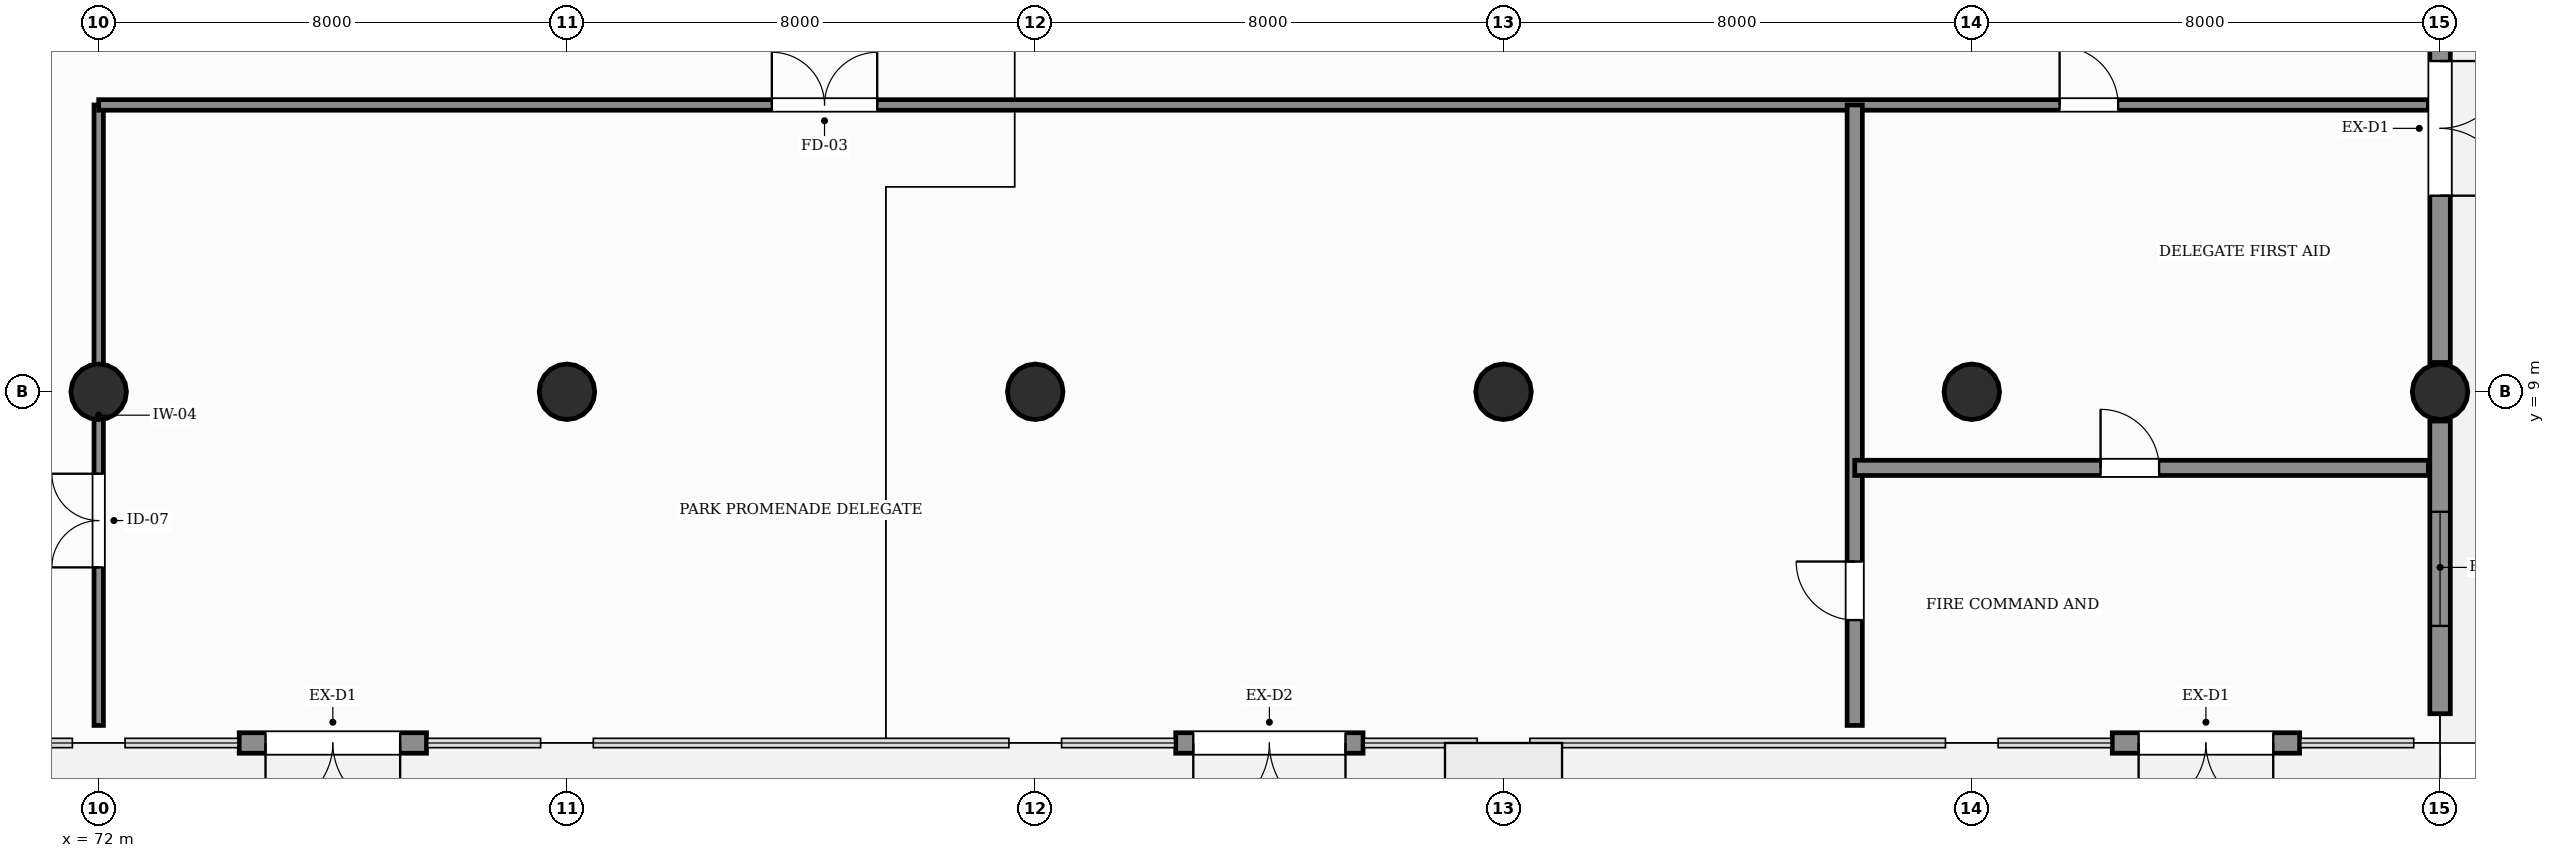
"""IFC4 building model, lengths in metres.
Left out: names, types, materials, properties, quantities, classifications, styles, units other than length and angle.
Written with IfcOpenShell. Run it as: python <this file> out.ifc"""

import sys

from ifc_helpers import new_model, si_unit, direction, frame, frame_2d, origin, origin_2d, place, context, subcontext, project, spatial, rectangle, circle, extrude, element, fill, save


model = new_model("IFC4")
c1 = context("Model", 3, precision=1e-05, world=origin(), true_north=direction((0.0, 1.0)))
c2 = subcontext(c1, "Body", "Model", "MODEL_VIEW")
j1 = project(units=[si_unit("LENGTHUNIT", "METRE"), si_unit("PLANEANGLEUNIT", "RADIAN")], contexts=[c1])
p1 = place(None, origin())
s1 = spatial("IfcSite", under=j1, at=p1, CompositionType="ELEMENT")
p2 = place(p1, origin())
s2 = spatial("IfcBuilding", under=s1, at=p2, CompositionType="ELEMENT")
p3 = place(p2, origin())
s3 = spatial("IfcBuildingStorey", under=s2, at=p3, CompositionType="ELEMENT", Elevation=0.0)
for number, where, z_axis, x_axis in (
    (1, (72.0, 9.0, 0.0), (0.0, 0.0, 1.0), (1.0, 0.0, 0.0)),
    (2, (80.0, 9.0, 0.0), (0.0, 0.0, 1.0), (1.0, 0.0, 0.0)),
    (3, (88.0, 9.0, 0.0), (0.0, 0.0, 1.0), (1.0, 0.0, 0.0)),
    (4, (96.0, 9.0, 0.0), (0.0, 0.0, 1.0), (1.0, 0.0, 0.0)),
    (5, (104.0, 9.0, 0.0), (0.0, 0.0, 1.0), (1.0, 0.0, 0.0)),
    (6, (112.0, 9.0, 0.0), (0.0, 0.0, 1.0), (1.0, 0.0, 0.0)),
):
    element("IfcColumn", number, at=place(p3, frame(where, z_axis=z_axis, x_axis=x_axis)), inside=s3, PredefinedType="COLUMN", context=c2, shape_type="SweptSolid", body=[
        extrude(circle(Radius=0.475, at=origin_2d()), origin(), (0.0, 0.0, 1.0), 6.0),
    ])
p4 = place(p3, frame((74.4, 3.0, 0.0), z_axis=(0.0, 0.0, 1.0), x_axis=(1.0, 0.0, 0.0)))
e7 = element("IfcWall", 7, at=p4, inside=s3, PredefinedType="SOLIDWALL", context=c2, shape_type="SweptSolid", body=[
    extrude(rectangle(XDim=3.2, YDim=0.35, at=frame_2d((1.6, 0.0))), origin(), (0.0, 0.0, 1.0), 4.7),
])
p5 = place(p4, frame((0.45, 0.0, 0.0)))
e8 = element("IfcOpeningElement", 8, at=p5, cuts=e7, PredefinedType="OPENING", context=c2, shape_type="SweptSolid", body=[
    extrude(rectangle(XDim=2.3, YDim=2.4, at=frame_2d((1.15, 1.2))), frame((0.0, 0.185, 0.0), z_axis=(0.0, -1.0, 0.0), x_axis=(1.0, 0.0, 0.0)), (0.0, 0.0, 1.0), 0.37),
])
p6 = place(p3, frame((90.4, 3.0, 0.0), z_axis=(0.0, 0.0, 1.0), x_axis=(1.0, 0.0, 0.0)))
e9 = element("IfcWall", 9, at=p6, inside=s3, PredefinedType="SOLIDWALL", context=c2, shape_type="SweptSolid", body=[
    extrude(rectangle(XDim=3.2, YDim=0.35, at=frame_2d((1.6, 0.0))), origin(), (0.0, 0.0, 1.0), 4.7),
])
p7 = place(p6, frame((0.3, 0.0, 0.0)))
e10 = element("IfcOpeningElement", 10, at=p7, cuts=e9, PredefinedType="OPENING", context=c2, shape_type="SweptSolid", body=[
    extrude(rectangle(XDim=2.6, YDim=2.7, at=frame_2d((1.3, 1.35))), frame((0.0, 0.185, 0.0), z_axis=(0.0, -1.0, 0.0), x_axis=(1.0, 0.0, 0.0)), (0.0, 0.0, 1.0), 0.37),
])
p8 = place(p3, frame((106.4, 3.0, 0.0), z_axis=(0.0, 0.0, 1.0), x_axis=(1.0, 0.0, 0.0)))
e11 = element("IfcWall", 11, at=p8, inside=s3, PredefinedType="SOLIDWALL", context=c2, shape_type="SweptSolid", body=[
    extrude(rectangle(XDim=3.2, YDim=0.35, at=frame_2d((1.6, 0.0))), origin(), (0.0, 0.0, 1.0), 4.7),
])
p9 = place(p8, frame((0.45, 0.0, 0.0)))
e12 = element("IfcOpeningElement", 12, at=p9, cuts=e11, PredefinedType="OPENING", context=c2, shape_type="SweptSolid", body=[
    extrude(rectangle(XDim=2.3, YDim=2.4, at=frame_2d((1.15, 1.2))), frame((0.0, 0.185, 0.0), z_axis=(0.0, -1.0, 0.0), x_axis=(1.0, 0.0, 0.0)), (0.0, 0.0, 1.0), 0.37),
])
p10 = place(p3, frame((112.0, 3.5, 0.0), z_axis=(0.0, 0.0, 1.0), x_axis=(0.0, 1.0, 0.0)))
e13 = element("IfcWall", 13, at=p10, inside=s3, PredefinedType="SOLIDWALL", context=c2, shape_type="SweptSolid", body=[
    extrude(rectangle(XDim=5.0, YDim=0.35, at=frame_2d((2.5, 0.0))), origin(), (0.0, 0.0, 1.0), 4.7),
])
p11 = place(p10, frame((1.5, 0.0, 1.0)))
e14 = element("IfcOpeningElement", 14, at=p11, cuts=e13, PredefinedType="OPENING", context=c2, shape_type="SweptSolid", body=[
    extrude(rectangle(XDim=1.95, YDim=1.85, at=frame_2d((0.975, 0.925))), frame((0.0, 0.185, 0.0), z_axis=(0.0, -1.0, 0.0), x_axis=(1.0, 0.0, 0.0)), (0.0, 0.0, 1.0), 0.37),
])
p12 = place(p3, frame((112.0, 9.5, 0.0), z_axis=(0.0, 0.0, 1.0), x_axis=(0.0, 1.0, 0.0)))
e15 = element("IfcWall", 15, at=p12, inside=s3, PredefinedType="SOLIDWALL", context=c2, shape_type="SweptSolid", body=[
    extrude(rectangle(XDim=8.0, YDim=0.35, at=frame_2d((4.0, 0.0))), origin(), (0.0, 0.0, 1.0), 4.7),
])
p13 = place(p12, frame((2.85, 0.0, 0.0)))
e16 = element("IfcOpeningElement", 16, at=p13, cuts=e15, PredefinedType="OPENING", context=c2, shape_type="SweptSolid", body=[
    extrude(rectangle(XDim=2.3, YDim=2.4, at=frame_2d((1.15, 1.2))), frame((0.0, 0.185, 0.0), z_axis=(0.0, -1.0, 0.0), x_axis=(1.0, 0.0, 0.0)), (0.0, 0.0, 1.0), 0.37),
])
p14 = place(p3, frame((72.0, 3.3, 0.0), z_axis=(0.0, 0.0, 1.0), x_axis=(0.0, 1.0, 0.0)))
e17 = element("IfcWall", 17, at=p14, inside=s3, PredefinedType="PARTITIONING", context=c2, shape_type="SweptSolid", body=[
    extrude(rectangle(XDim=10.6, YDim=0.16, at=frame_2d((5.3, 0.0))), origin(), (0.0, 0.0, 1.0), 4.65),
])
p15 = place(p14, frame((2.7, 0.0, 0.0)))
e18 = element("IfcOpeningElement", 18, at=p15, cuts=e17, PredefinedType="OPENING", context=c2, shape_type="SweptSolid", body=[
    extrude(rectangle(XDim=1.6, YDim=2.3, at=frame_2d((0.8, 1.15))), frame((0.0, 0.09, 0.0), z_axis=(0.0, -1.0, 0.0), x_axis=(1.0, 0.0, 0.0)), (0.0, 0.0, 1.0), 0.18),
])
p16 = place(p3, frame((72.0, 13.9, 0.0), z_axis=(0.0, 0.0, 1.0), x_axis=(1.0, 0.0, 0.0)))
e19 = element("IfcWall", 19, at=p16, inside=s3, PredefinedType="PARTITIONING", context=c2, shape_type="SweptSolid", body=[
    extrude(rectangle(XDim=39.8, YDim=0.18, at=frame_2d((19.9, 0.0))), origin(), (0.0, 0.0, 1.0), 4.65),
])
p17 = place(p16, frame((11.5, 0.0, 0.0)))
e20 = element("IfcOpeningElement", 20, at=p17, cuts=e19, PredefinedType="OPENING", context=c2, shape_type="SweptSolid", body=[
    extrude(rectangle(XDim=1.8, YDim=2.25, at=frame_2d((0.9, 1.125))), frame((0.0, 0.1, 0.0), z_axis=(0.0, -1.0, 0.0), x_axis=(1.0, 0.0, 0.0)), (0.0, 0.0, 1.0), 0.2),
])
p18 = place(p16, frame((33.5, 0.0, 0.0)))
e21 = element("IfcOpeningElement", 21, at=p18, cuts=e19, PredefinedType="OPENING", context=c2, shape_type="SweptSolid", body=[
    extrude(rectangle(XDim=1.0, YDim=2.15, at=frame_2d((0.5, 1.075))), frame((0.0, 0.1, 0.0), z_axis=(0.0, -1.0, 0.0), x_axis=(1.0, 0.0, 0.0)), (0.0, 0.0, 1.0), 0.2),
])
p19 = place(p3, frame((102.0, 3.3, 0.0), z_axis=(0.0, 0.0, 1.0), x_axis=(0.0, 1.0, 0.0)))
e22 = element("IfcWall", 22, at=p19, inside=s3, PredefinedType="SOLIDWALL", context=c2, shape_type="SweptSolid", body=[
    extrude(rectangle(XDim=10.6, YDim=0.26, at=frame_2d((5.3, 0.0))), origin(), (0.0, 0.0, 1.0), 6.0),
])
p20 = place(p19, frame((1.8, 0.0, 0.0)))
e23 = element("IfcOpeningElement", 23, at=p20, cuts=e22, PredefinedType="OPENING", context=c2, shape_type="SweptSolid", body=[
    extrude(rectangle(XDim=1.0, YDim=2.15, at=frame_2d((0.5, 1.075))), frame((0.0, 0.14, 0.0), z_axis=(0.0, -1.0, 0.0), x_axis=(1.0, 0.0, 0.0)), (0.0, 0.0, 1.0), 0.28),
])
p21 = place(p3, frame((102.0, 7.7, 0.0), z_axis=(0.0, 0.0, 1.0), x_axis=(1.0, 0.0, 0.0)))
e24 = element("IfcWall", 24, at=p21, inside=s3, PredefinedType="SOLIDWALL", context=c2, shape_type="SweptSolid", body=[
    extrude(rectangle(XDim=9.8, YDim=0.26, at=frame_2d((4.9, 0.0))), origin(), (0.0, 0.0, 1.0), 6.0),
])
p22 = place(p21, frame((4.2, 0.0, 0.0)))
e25 = element("IfcOpeningElement", 25, at=p22, cuts=e24, PredefinedType="OPENING", context=c2, shape_type="SweptSolid", body=[
    extrude(rectangle(XDim=1.0, YDim=2.15, at=frame_2d((0.5, 1.075))), frame((0.0, 0.14, 0.0), z_axis=(0.0, -1.0, 0.0), x_axis=(1.0, 0.0, 0.0)), (0.0, 0.0, 1.0), 0.28),
])
p23 = place(p5, frame((2.3, 0.0, 0.0), z_axis=(0.0, 0.0, 1.0), x_axis=(-1.0, 0.0, 0.0)))
e26 = element("IfcDoor", 26, at=p23, inside=s3, OperationType="DOUBLE_DOOR_SINGLE_SWING", PredefinedType="DOOR", context=c2, shape_type="SweptSolid", body=[
    extrude(rectangle(XDim=2.3, YDim=2.4, at=frame_2d((1.15, 1.2))), frame((0.0, 0.025, 0.0), z_axis=(0.0, -1.0, 0.0), x_axis=(1.0, 0.0, 0.0)), (0.0, 0.0, 1.0), 0.05),
])
fill(e8, e26)
p24 = place(p7, frame((2.6, 0.0, 0.0), z_axis=(0.0, 0.0, 1.0), x_axis=(-1.0, 0.0, 0.0)))
e27 = element("IfcDoor", 27, at=p24, inside=s3, OperationType="DOUBLE_DOOR_SINGLE_SWING", PredefinedType="DOOR", context=c2, shape_type="SweptSolid", body=[
    extrude(rectangle(XDim=2.6, YDim=2.7, at=frame_2d((1.3, 1.35))), frame((0.0, 0.025, 0.0), z_axis=(0.0, -1.0, 0.0), x_axis=(1.0, 0.0, 0.0)), (0.0, 0.0, 1.0), 0.05),
])
fill(e10, e27)
p25 = place(p9, frame((2.3, 0.0, 0.0), z_axis=(0.0, 0.0, 1.0), x_axis=(-1.0, 0.0, 0.0)))
e28 = element("IfcDoor", 28, at=p25, inside=s3, OperationType="DOUBLE_DOOR_SINGLE_SWING", PredefinedType="DOOR", context=c2, shape_type="SweptSolid", body=[
    extrude(rectangle(XDim=2.3, YDim=2.4, at=frame_2d((1.15, 1.2))), frame((0.0, 0.025, 0.0), z_axis=(0.0, -1.0, 0.0), x_axis=(1.0, 0.0, 0.0)), (0.0, 0.0, 1.0), 0.05),
])
fill(e12, e28)
p26 = place(p11, origin())
e29 = element("IfcWindow", 29, at=p26, inside=s3, PartitioningType="SINGLE_PANEL", PredefinedType="WINDOW", context=c2, shape_type="SweptSolid", body=[
    extrude(rectangle(XDim=1.95, YDim=1.85, at=frame_2d((0.975, 0.925))), frame((0.0, 0.03, 0.0), z_axis=(0.0, -1.0, 0.0), x_axis=(1.0, 0.0, 0.0)), (0.0, 0.0, 1.0), 0.06),
])
fill(e14, e29)
p27 = place(p13, frame((2.3, 0.0, 0.0), z_axis=(0.0, 0.0, 1.0), x_axis=(-1.0, 0.0, 0.0)))
e30 = element("IfcDoor", 30, at=p27, inside=s3, OperationType="DOUBLE_DOOR_SINGLE_SWING", PredefinedType="DOOR", context=c2, shape_type="SweptSolid", body=[
    extrude(rectangle(XDim=2.3, YDim=2.4, at=frame_2d((1.15, 1.2))), frame((0.0, 0.025, 0.0), z_axis=(0.0, -1.0, 0.0), x_axis=(1.0, 0.0, 0.0)), (0.0, 0.0, 1.0), 0.05),
])
fill(e16, e30)
p28 = place(p15, origin())
e31 = element("IfcDoor", 31, at=p28, inside=s3, OperationType="DOUBLE_DOOR_SINGLE_SWING", PredefinedType="DOOR", context=c2, shape_type="SweptSolid", body=[
    extrude(rectangle(XDim=1.6, YDim=2.3, at=frame_2d((0.8, 1.15))), frame((0.0, 0.025, 0.0), z_axis=(0.0, -1.0, 0.0), x_axis=(1.0, 0.0, 0.0)), (0.0, 0.0, 1.0), 0.05),
])
fill(e18, e31)
p29 = place(p17, origin())
e32 = element("IfcDoor", 32, at=p29, inside=s3, OperationType="DOUBLE_DOOR_SINGLE_SWING", PredefinedType="DOOR", context=c2, shape_type="SweptSolid", body=[
    extrude(rectangle(XDim=1.8, YDim=2.25, at=frame_2d((0.9, 1.125))), frame((0.0, 0.025, 0.0), z_axis=(0.0, -1.0, 0.0), x_axis=(1.0, 0.0, 0.0)), (0.0, 0.0, 1.0), 0.05),
])
fill(e20, e32)
p30 = place(p18, origin())
e33 = element("IfcDoor", 33, at=p30, inside=s3, OperationType="SINGLE_SWING_LEFT", PredefinedType="DOOR", context=c2, shape_type="SweptSolid", body=[
    extrude(rectangle(XDim=1.0, YDim=2.15, at=frame_2d((0.5, 1.075))), frame((0.0, 0.025, 0.0), z_axis=(0.0, -1.0, 0.0), x_axis=(1.0, 0.0, 0.0)), (0.0, 0.0, 1.0), 0.05),
])
fill(e21, e33)
p31 = place(p20, origin())
e34 = element("IfcDoor", 34, at=p31, inside=s3, OperationType="SINGLE_SWING_RIGHT", PredefinedType="DOOR", context=c2, shape_type="SweptSolid", body=[
    extrude(rectangle(XDim=1.0, YDim=2.15, at=frame_2d((0.5, 1.075))), frame((0.0, 0.025, 0.0), z_axis=(0.0, -1.0, 0.0), x_axis=(1.0, 0.0, 0.0)), (0.0, 0.0, 1.0), 0.05),
])
fill(e23, e34)
p32 = place(p22, origin())
e35 = element("IfcDoor", 35, at=p32, inside=s3, OperationType="SINGLE_SWING_LEFT", PredefinedType="DOOR", context=c2, shape_type="SweptSolid", body=[
    extrude(rectangle(XDim=1.0, YDim=2.15, at=frame_2d((0.5, 1.075))), frame((0.0, 0.025, 0.0), z_axis=(0.0, -1.0, 0.0), x_axis=(1.0, 0.0, 0.0)), (0.0, 0.0, 1.0), 0.05),
])
fill(e25, e35)
save(model, sys.argv[1])
